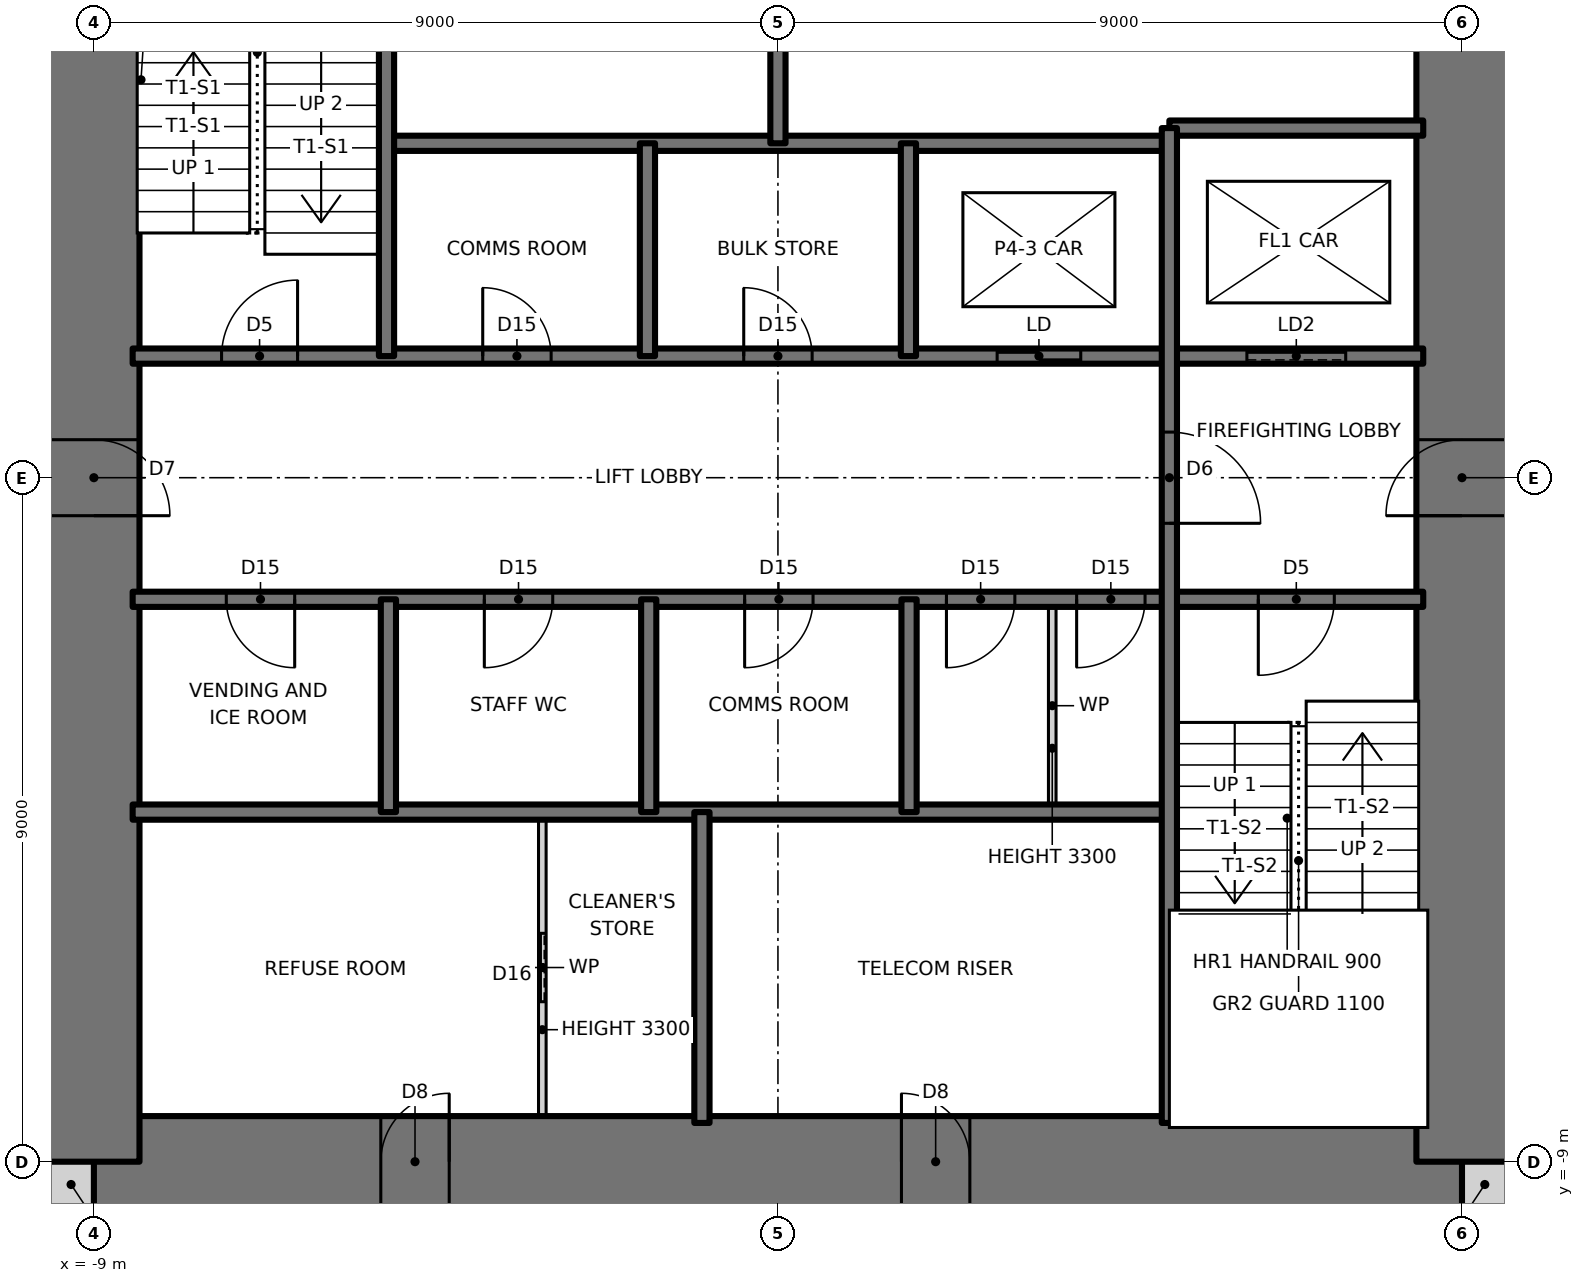
"""IFC4 building model, lengths in metres.
Left out: names, types, materials, properties, quantities, classifications, styles, units other than length and angle.
Written with IfcOpenShell. Run it as: python <this file> out.ifc"""

import sys

from ifc_helpers import new_model, si_unit, direction, frame, frame_2d, origin, place, context, subcontext, project, spatial, rectangle, extrude, element, fill, save


model = new_model("IFC4")
c1 = context("Model", 3, precision=1e-05, world=origin(), true_north=direction((0.0, 1.0)))
c2 = subcontext(c1, "Body", "Model", "MODEL_VIEW")
j1 = project(units=[si_unit("LENGTHUNIT", "METRE"), si_unit("PLANEANGLEUNIT", "RADIAN")], contexts=[c1])
p1 = place(None, origin())
s1 = spatial("IfcSite", under=j1, at=p1, CompositionType="ELEMENT")
p2 = place(p1, origin())
s2 = spatial("IfcBuilding", under=s1, at=p2, CompositionType="ELEMENT")
p3 = place(p2, frame((0.0, 0.0, 250.0)))
s3 = spatial("IfcBuildingStorey", under=s2, at=p3, CompositionType="ELEMENT", Elevation=250.0)
for number, where, z_axis, x_axis in (
    (1, (-9.6, -9.3, 0.0), (0.0, 0.0, 1.0), (1.0, 0.0, 0.0)),
    (2, (9.0, -9.3, 0.0), (0.0, 0.0, 1.0), (1.0, 0.0, 0.0)),
):
    element("IfcWall", number, at=place(p3, frame(where, z_axis=z_axis, x_axis=x_axis)), inside=s3, PredefinedType="SOLIDWALL", context=c2, shape_type="SweptSolid", body=[
        extrude(rectangle(XDim=0.6, YDim=0.6, at=frame_2d((0.3, 0.0))), origin(), (0.0, 0.0, 1.0), 3.5),
    ])
p4 = place(p3, frame((-9.0, -9.0, 0.0), z_axis=(0.0, 0.0, 1.0), x_axis=(1.0, 0.0, 0.0)))
e3 = element("IfcWall", 3, at=p4, inside=s3, PredefinedType="SHEAR", context=c2, shape_type="SweptSolid", body=[
    extrude(rectangle(XDim=18.0, YDim=1.2, at=frame_2d((9.0, 0.0))), origin(), (0.0, 0.0, 1.0), 3.5),
])
p5 = place(p4, frame((3.775, 0.0, 0.0)))
e4 = element("IfcOpeningElement", 4, at=p5, cuts=e3, PredefinedType="OPENING", context=c2, shape_type="SweptSolid", body=[
    extrude(rectangle(XDim=0.9, YDim=2.1, at=frame_2d((0.45, 1.05))), frame((0.0, 0.61, 0.0), z_axis=(0.0, -1.0, 0.0), x_axis=(1.0, 0.0, 0.0)), (0.0, 0.0, 1.0), 1.22),
])
p6 = place(p4, frame((10.625, 0.0, 0.0)))
e5 = element("IfcOpeningElement", 5, at=p6, cuts=e3, PredefinedType="OPENING", context=c2, shape_type="SweptSolid", body=[
    extrude(rectangle(XDim=0.9, YDim=2.1, at=frame_2d((0.45, 1.05))), frame((0.0, 0.61, 0.0), z_axis=(0.0, -1.0, 0.0), x_axis=(1.0, 0.0, 0.0)), (0.0, 0.0, 1.0), 1.22),
])
p7 = place(p3, frame((9.0, -9.0, 0.0), z_axis=(0.0, 0.0, 1.0), x_axis=(0.0, 1.0, 0.0)))
e6 = element("IfcWall", 6, at=p7, inside=s3, PredefinedType="SHEAR", context=c2, shape_type="SweptSolid", body=[
    extrude(rectangle(XDim=18.0, YDim=1.2, at=frame_2d((9.0, 0.0))), origin(), (0.0, 0.0, 1.0), 3.5),
])
p8 = place(p7, frame((8.5, 0.0, 0.0)))
e7 = element("IfcOpeningElement", 7, at=p8, cuts=e6, PredefinedType="OPENING", context=c2, shape_type="SweptSolid", body=[
    extrude(rectangle(XDim=1.0, YDim=2.1, at=frame_2d((0.5, 1.05))), frame((0.0, 0.61, 0.0), z_axis=(0.0, -1.0, 0.0), x_axis=(1.0, 0.0, 0.0)), (0.0, 0.0, 1.0), 1.22),
])
p9 = place(p3, frame((-9.0, 9.0, 0.0), z_axis=(0.0, 0.0, 1.0), x_axis=(0.0, -1.0, 0.0)))
e8 = element("IfcWall", 8, at=p9, inside=s3, PredefinedType="SHEAR", context=c2, shape_type="SweptSolid", body=[
    extrude(rectangle(XDim=18.0, YDim=1.2, at=frame_2d((9.0, 0.0))), origin(), (0.0, 0.0, 1.0), 3.5),
])
p10 = place(p9, frame((8.5, 0.0, 0.0)))
e9 = element("IfcOpeningElement", 9, at=p10, cuts=e8, PredefinedType="OPENING", context=c2, shape_type="SweptSolid", body=[
    extrude(rectangle(XDim=1.0, YDim=2.1, at=frame_2d((0.5, 1.05))), frame((0.0, 0.61, 0.0), z_axis=(0.0, -1.0, 0.0), x_axis=(1.0, 0.0, 0.0)), (0.0, 0.0, 1.0), 1.22),
])
p11 = place(p3, frame((-8.49, -4.4, 0.0), z_axis=(0.0, 0.0, 1.0), x_axis=(1.0, 0.0, 0.0)))
e10 = element("IfcWall", 10, at=p11, inside=s3, PredefinedType="SOLIDWALL", context=c2, shape_type="SweptSolid", body=[
    extrude(rectangle(XDim=13.64, YDim=0.2, at=frame_2d((6.82, 0.0))), origin(), (0.0, 0.0, 1.0), 3.5),
])
p12 = place(p3, frame((-8.49, -1.6, 0.0), z_axis=(0.0, 0.0, 1.0), x_axis=(1.0, 0.0, 0.0)))
e11 = element("IfcWall", 11, at=p12, inside=s3, PredefinedType="SOLIDWALL", context=c2, shape_type="SweptSolid", body=[
    extrude(rectangle(XDim=16.98, YDim=0.2, at=frame_2d((8.49, 0.0))), origin(), (0.0, 0.0, 1.0), 3.5),
])
p13 = place(p12, frame((14.81, 0.0, 0.0)))
e12 = element("IfcOpeningElement", 12, at=p13, cuts=e11, PredefinedType="OPENING", context=c2, shape_type="SweptSolid", body=[
    extrude(rectangle(XDim=1.0, YDim=2.1, at=frame_2d((0.5, 1.05))), frame((0.0, 0.11, 0.0), z_axis=(0.0, -1.0, 0.0), x_axis=(1.0, 0.0, 0.0)), (0.0, 0.0, 1.0), 0.22),
])
p14 = place(p12, frame((1.232, 0.0, 0.0)))
e13 = element("IfcOpeningElement", 13, at=p14, cuts=e11, PredefinedType="OPENING", context=c2, shape_type="SweptSolid", body=[
    extrude(rectangle(XDim=0.9, YDim=2.1, at=frame_2d((0.45, 1.05))), frame((0.0, 0.11, 0.0), z_axis=(0.0, -1.0, 0.0), x_axis=(1.0, 0.0, 0.0)), (0.0, 0.0, 1.0), 0.22),
])
p15 = place(p12, frame((4.627, 0.0, 0.0)))
e14 = element("IfcOpeningElement", 14, at=p15, cuts=e11, PredefinedType="OPENING", context=c2, shape_type="SweptSolid", body=[
    extrude(rectangle(XDim=0.9, YDim=2.1, at=frame_2d((0.45, 1.05))), frame((0.0, 0.11, 0.0), z_axis=(0.0, -1.0, 0.0), x_axis=(1.0, 0.0, 0.0)), (0.0, 0.0, 1.0), 0.22),
])
p16 = place(p12, frame((8.052, 0.0, 0.0)))
e15 = element("IfcOpeningElement", 15, at=p16, cuts=e11, PredefinedType="OPENING", context=c2, shape_type="SweptSolid", body=[
    extrude(rectangle(XDim=0.9, YDim=2.1, at=frame_2d((0.45, 1.05))), frame((0.0, 0.11, 0.0), z_axis=(0.0, -1.0, 0.0), x_axis=(1.0, 0.0, 0.0)), (0.0, 0.0, 1.0), 0.22),
])
p17 = place(p12, frame((12.42, 0.0, 0.0)))
e16 = element("IfcOpeningElement", 16, at=p17, cuts=e11, PredefinedType="OPENING", context=c2, shape_type="SweptSolid", body=[
    extrude(rectangle(XDim=0.9, YDim=2.1, at=frame_2d((0.45, 1.05))), frame((0.0, 0.11, 0.0), z_axis=(0.0, -1.0, 0.0), x_axis=(1.0, 0.0, 0.0)), (0.0, 0.0, 1.0), 0.22),
])
p18 = place(p12, frame((10.707, 0.0, 0.0)))
e17 = element("IfcOpeningElement", 17, at=p18, cuts=e11, PredefinedType="OPENING", context=c2, shape_type="SweptSolid", body=[
    extrude(rectangle(XDim=0.9, YDim=2.1, at=frame_2d((0.45, 1.05))), frame((0.0, 0.11, 0.0), z_axis=(0.0, -1.0, 0.0), x_axis=(1.0, 0.0, 0.0)), (0.0, 0.0, 1.0), 0.22),
])
p19 = place(p3, frame((-8.49, 1.6, 0.0), z_axis=(0.0, 0.0, 1.0), x_axis=(1.0, 0.0, 0.0)))
e18 = element("IfcWall", 18, at=p19, inside=s3, PredefinedType="SOLIDWALL", context=c2, shape_type="SweptSolid", body=[
    extrude(rectangle(XDim=16.98, YDim=0.2, at=frame_2d((8.49, 0.0))), origin(), (0.0, 0.0, 1.0), 3.5),
])
p20 = place(p19, frame((1.17, 0.0, 0.0)))
e19 = element("IfcOpeningElement", 19, at=p20, cuts=e18, PredefinedType="OPENING", context=c2, shape_type="SweptSolid", body=[
    extrude(rectangle(XDim=1.0, YDim=2.1, at=frame_2d((0.5, 1.05))), frame((0.0, 0.11, 0.0), z_axis=(0.0, -1.0, 0.0), x_axis=(1.0, 0.0, 0.0)), (0.0, 0.0, 1.0), 0.22),
])
p21 = place(p19, frame((4.606, 0.0, 0.0)))
e20 = element("IfcOpeningElement", 20, at=p21, cuts=e18, PredefinedType="OPENING", context=c2, shape_type="SweptSolid", body=[
    extrude(rectangle(XDim=0.9, YDim=2.1, at=frame_2d((0.45, 1.05))), frame((0.0, 0.11, 0.0), z_axis=(0.0, -1.0, 0.0), x_axis=(1.0, 0.0, 0.0)), (0.0, 0.0, 1.0), 0.22),
])
p22 = place(p19, frame((8.04, 0.0, 0.0)))
e21 = element("IfcOpeningElement", 21, at=p22, cuts=e18, PredefinedType="OPENING", context=c2, shape_type="SweptSolid", body=[
    extrude(rectangle(XDim=0.9, YDim=2.1, at=frame_2d((0.45, 1.05))), frame((0.0, 0.11, 0.0), z_axis=(0.0, -1.0, 0.0), x_axis=(1.0, 0.0, 0.0)), (0.0, 0.0, 1.0), 0.22),
])
p23 = place(p19, frame((11.374, 0.0, 0.0)))
e22 = element("IfcOpeningElement", 22, at=p23, cuts=e18, PredefinedType="OPENING", context=c2, shape_type="SweptSolid", body=[
    extrude(rectangle(XDim=1.1, YDim=2.1, at=frame_2d((0.55, 1.05))), frame((0.0, 0.11, 0.0), z_axis=(0.0, -1.0, 0.0), x_axis=(1.0, 0.0, 0.0)), (0.0, 0.0, 1.0), 0.22),
])
p24 = place(p19, frame((14.66, 0.0, 0.0)))
e23 = element("IfcOpeningElement", 23, at=p24, cuts=e18, PredefinedType="OPENING", context=c2, shape_type="SweptSolid", body=[
    extrude(rectangle(XDim=1.3, YDim=2.1, at=frame_2d((0.65, 1.05))), frame((0.0, 0.11, 0.0), z_axis=(0.0, -1.0, 0.0), x_axis=(1.0, 0.0, 0.0)), (0.0, 0.0, 1.0), 0.22),
])
p25 = place(p3, frame((-5.15, 4.4, 0.0), z_axis=(0.0, 0.0, 1.0), x_axis=(1.0, 0.0, 0.0)))
e24 = element("IfcWall", 24, at=p25, inside=s3, PredefinedType="SOLIDWALL", context=c2, shape_type="SweptSolid", body=[
    extrude(rectangle(XDim=10.3, YDim=0.2, at=frame_2d((5.15, 0.0))), origin(), (0.0, 0.0, 1.0), 3.5),
])
p26 = place(p3, frame((5.15, 4.6, 0.0), z_axis=(0.0, 0.0, 1.0), x_axis=(1.0, 0.0, 0.0)))
e25 = element("IfcWall", 25, at=p26, inside=s3, PredefinedType="SOLIDWALL", context=c2, shape_type="SweptSolid", body=[
    extrude(rectangle(XDim=3.34, YDim=0.2, at=frame_2d((1.67, 0.0))), origin(), (0.0, 0.0, 1.0), 3.5),
])
p27 = place(p3, frame((5.15, -8.49, 0.0), z_axis=(0.0, 0.0, 1.0), x_axis=(0.0, 1.0, 0.0)))
e26 = element("IfcWall", 26, at=p27, inside=s3, PredefinedType="SOLIDWALL", context=c2, shape_type="SweptSolid", body=[
    extrude(rectangle(XDim=13.09, YDim=0.2, at=frame_2d((6.545, 0.0))), origin(), (0.0, 0.0, 1.0), 3.5),
])
p28 = place(p27, frame((7.89, 0.0, 0.0)))
e27 = element("IfcOpeningElement", 27, at=p28, cuts=e26, PredefinedType="OPENING", context=c2, shape_type="SweptSolid", body=[
    extrude(rectangle(XDim=1.2, YDim=2.1, at=frame_2d((0.6, 1.05))), frame((0.0, 0.11, 0.0), z_axis=(0.0, -1.0, 0.0), x_axis=(1.0, 0.0, 0.0)), (0.0, 0.0, 1.0), 0.22),
])
p29 = place(p3, frame((3.609, -4.4, 0.0), z_axis=(0.0, 0.0, 1.0), x_axis=(0.0, 1.0, 0.0)))
e28 = element("IfcWall", 28, at=p29, inside=s3, PredefinedType="PARTITIONING", context=c2, shape_type="SweptSolid", body=[
    extrude(rectangle(XDim=2.8, YDim=0.1, at=frame_2d((1.4, 0.0))), origin(), (0.0, 0.0, 1.0), 3.3),
])
for number, where, z_axis, x_axis in (
    (29, (1.725, -4.4, 0.0), (0.0, 0.0, 1.0), (0.0, 1.0, 0.0)),
    (30, (1.717, 1.6, 0.0), (0.0, 0.0, 1.0), (0.0, 1.0, 0.0)),
):
    element("IfcWall", number, at=place(p3, frame(where, z_axis=z_axis, x_axis=x_axis)), inside=s3, PredefinedType="SOLIDWALL", context=c2, shape_type="SweptSolid", body=[
        extrude(rectangle(XDim=2.8, YDim=0.2, at=frame_2d((1.4, 0.0))), origin(), (0.0, 0.0, 1.0), 3.5),
    ])
for number, where, z_axis, x_axis in (
    (31, (0.0, 4.4, 0.0), (0.0, 0.0, 1.0), (0.0, 1.0, 0.0)),
    (32, (-1.0, -8.49, 0.0), (0.0, 0.0, 1.0), (0.0, 1.0, 0.0)),
):
    element("IfcWall", number, at=place(p3, frame(where, z_axis=z_axis, x_axis=x_axis)), inside=s3, PredefinedType="SOLIDWALL", context=c2, shape_type="SweptSolid", body=[
        extrude(rectangle(XDim=4.09, YDim=0.2, at=frame_2d((2.045, 0.0))), origin(), (0.0, 0.0, 1.0), 3.5),
    ])
for number, where, z_axis, x_axis in (
    (33, (-1.7, -4.4, 0.0), (0.0, 0.0, 1.0), (0.0, 1.0, 0.0)),
    (34, (-1.717, 1.6, 0.0), (0.0, 0.0, 1.0), (0.0, 1.0, 0.0)),
):
    element("IfcWall", number, at=place(p3, frame(where, z_axis=z_axis, x_axis=x_axis)), inside=s3, PredefinedType="SOLIDWALL", context=c2, shape_type="SweptSolid", body=[
        extrude(rectangle(XDim=2.8, YDim=0.2, at=frame_2d((1.4, 0.0))), origin(), (0.0, 0.0, 1.0), 3.5),
    ])
p30 = place(p3, frame((-3.1, -8.49, 0.0), z_axis=(0.0, 0.0, 1.0), x_axis=(0.0, 1.0, 0.0)))
e35 = element("IfcWall", 35, at=p30, inside=s3, PredefinedType="PARTITIONING", context=c2, shape_type="SweptSolid", body=[
    extrude(rectangle(XDim=4.09, YDim=0.1, at=frame_2d((2.045, 0.0))), origin(), (0.0, 0.0, 1.0), 3.3),
])
p31 = place(p30, frame((1.595, 0.0, 0.0)))
e36 = element("IfcOpeningElement", 36, at=p31, cuts=e35, PredefinedType="OPENING", context=c2, shape_type="SweptSolid", body=[
    extrude(rectangle(XDim=0.9, YDim=2.1, at=frame_2d((0.45, 1.05))), frame((0.0, 0.06, 0.0), z_axis=(0.0, -1.0, 0.0), x_axis=(1.0, 0.0, 0.0)), (0.0, 0.0, 1.0), 0.12),
])
p32 = place(p3, frame((-5.125, -4.4, 0.0), z_axis=(0.0, 0.0, 1.0), x_axis=(0.0, 1.0, 0.0)))
e37 = element("IfcWall", 37, at=p32, inside=s3, PredefinedType="SOLIDWALL", context=c2, shape_type="SweptSolid", body=[
    extrude(rectangle(XDim=2.8, YDim=0.2, at=frame_2d((1.4, 0.0))), origin(), (0.0, 0.0, 1.0), 3.5),
])
p33 = place(p3, frame((-5.15, 1.6, 0.0), z_axis=(0.0, 0.0, 1.0), x_axis=(0.0, 1.0, 0.0)))
e38 = element("IfcWall", 38, at=p33, inside=s3, PredefinedType="SOLIDWALL", context=c2, shape_type="SweptSolid", body=[
    extrude(rectangle(XDim=6.89, YDim=0.2, at=frame_2d((3.445, 0.0))), origin(), (0.0, 0.0, 1.0), 3.5),
])
p34 = place(p20, origin())
e39 = element("IfcDoor", 39, at=p34, inside=s3, OperationType="SINGLE_SWING_RIGHT", PredefinedType="DOOR", context=c2, shape_type="SweptSolid", body=[
    extrude(rectangle(XDim=1.0, YDim=2.1, at=frame_2d((0.5, 1.05))), frame((0.0, 0.025, 0.0), z_axis=(0.0, -1.0, 0.0), x_axis=(1.0, 0.0, 0.0)), (0.0, 0.0, 1.0), 0.05),
])
fill(e19, e39)
p35 = place(p13, frame((1.0, 0.0, 0.0), z_axis=(0.0, 0.0, 1.0), x_axis=(-1.0, 0.0, 0.0)))
e40 = element("IfcDoor", 40, at=p35, inside=s3, OperationType="SINGLE_SWING_RIGHT", PredefinedType="DOOR", context=c2, shape_type="SweptSolid", body=[
    extrude(rectangle(XDim=1.0, YDim=2.1, at=frame_2d((0.5, 1.05))), frame((0.0, 0.025, 0.0), z_axis=(0.0, -1.0, 0.0), x_axis=(1.0, 0.0, 0.0)), (0.0, 0.0, 1.0), 0.05),
])
fill(e12, e40)
p36 = place(p28, frame((1.2, 0.0, 0.0), z_axis=(0.0, 0.0, 1.0), x_axis=(-1.0, 0.0, 0.0)))
e41 = element("IfcDoor", 41, at=p36, inside=s3, OperationType="SINGLE_SWING_RIGHT", PredefinedType="DOOR", context=c2, shape_type="SweptSolid", body=[
    extrude(rectangle(XDim=1.2, YDim=2.1, at=frame_2d((0.6, 1.05))), frame((0.0, 0.025, 0.0), z_axis=(0.0, -1.0, 0.0), x_axis=(1.0, 0.0, 0.0)), (0.0, 0.0, 1.0), 0.05),
])
fill(e27, e41)
p37 = place(p21, origin())
e42 = element("IfcDoor", 42, at=p37, inside=s3, OperationType="SINGLE_SWING_LEFT", PredefinedType="DOOR", context=c2, shape_type="SweptSolid", body=[
    extrude(rectangle(XDim=0.9, YDim=2.1, at=frame_2d((0.45, 1.05))), frame((0.0, 0.025, 0.0), z_axis=(0.0, -1.0, 0.0), x_axis=(1.0, 0.0, 0.0)), (0.0, 0.0, 1.0), 0.05),
])
fill(e20, e42)
p38 = place(p22, origin())
e43 = element("IfcDoor", 43, at=p38, inside=s3, OperationType="SINGLE_SWING_LEFT", PredefinedType="DOOR", context=c2, shape_type="SweptSolid", body=[
    extrude(rectangle(XDim=0.9, YDim=2.1, at=frame_2d((0.45, 1.05))), frame((0.0, 0.025, 0.0), z_axis=(0.0, -1.0, 0.0), x_axis=(1.0, 0.0, 0.0)), (0.0, 0.0, 1.0), 0.05),
])
fill(e21, e43)
p39 = place(p14, frame((0.9, 0.0, 0.0), z_axis=(0.0, 0.0, 1.0), x_axis=(-1.0, 0.0, 0.0)))
e44 = element("IfcDoor", 44, at=p39, inside=s3, OperationType="SINGLE_SWING_LEFT", PredefinedType="DOOR", context=c2, shape_type="SweptSolid", body=[
    extrude(rectangle(XDim=0.9, YDim=2.1, at=frame_2d((0.45, 1.05))), frame((0.0, 0.025, 0.0), z_axis=(0.0, -1.0, 0.0), x_axis=(1.0, 0.0, 0.0)), (0.0, 0.0, 1.0), 0.05),
])
fill(e13, e44)
p40 = place(p15, frame((0.9, 0.0, 0.0), z_axis=(0.0, 0.0, 1.0), x_axis=(-1.0, 0.0, 0.0)))
e45 = element("IfcDoor", 45, at=p40, inside=s3, OperationType="SINGLE_SWING_RIGHT", PredefinedType="DOOR", context=c2, shape_type="SweptSolid", body=[
    extrude(rectangle(XDim=0.9, YDim=2.1, at=frame_2d((0.45, 1.05))), frame((0.0, 0.025, 0.0), z_axis=(0.0, -1.0, 0.0), x_axis=(1.0, 0.0, 0.0)), (0.0, 0.0, 1.0), 0.05),
])
fill(e14, e45)
p41 = place(p16, frame((0.9, 0.0, 0.0), z_axis=(0.0, 0.0, 1.0), x_axis=(-1.0, 0.0, 0.0)))
e46 = element("IfcDoor", 46, at=p41, inside=s3, OperationType="SINGLE_SWING_RIGHT", PredefinedType="DOOR", context=c2, shape_type="SweptSolid", body=[
    extrude(rectangle(XDim=0.9, YDim=2.1, at=frame_2d((0.45, 1.05))), frame((0.0, 0.025, 0.0), z_axis=(0.0, -1.0, 0.0), x_axis=(1.0, 0.0, 0.0)), (0.0, 0.0, 1.0), 0.05),
])
fill(e15, e46)
p42 = place(p17, frame((0.9, 0.0, 0.0), z_axis=(0.0, 0.0, 1.0), x_axis=(-1.0, 0.0, 0.0)))
e47 = element("IfcDoor", 47, at=p42, inside=s3, OperationType="SINGLE_SWING_RIGHT", PredefinedType="DOOR", context=c2, shape_type="SweptSolid", body=[
    extrude(rectangle(XDim=0.9, YDim=2.1, at=frame_2d((0.45, 1.05))), frame((0.0, 0.025, 0.0), z_axis=(0.0, -1.0, 0.0), x_axis=(1.0, 0.0, 0.0)), (0.0, 0.0, 1.0), 0.05),
])
fill(e16, e47)
p43 = place(p18, frame((0.9, 0.0, 0.0), z_axis=(0.0, 0.0, 1.0), x_axis=(-1.0, 0.0, 0.0)))
e48 = element("IfcDoor", 48, at=p43, inside=s3, OperationType="SINGLE_SWING_RIGHT", PredefinedType="DOOR", context=c2, shape_type="SweptSolid", body=[
    extrude(rectangle(XDim=0.9, YDim=2.1, at=frame_2d((0.45, 1.05))), frame((0.0, 0.025, 0.0), z_axis=(0.0, -1.0, 0.0), x_axis=(1.0, 0.0, 0.0)), (0.0, 0.0, 1.0), 0.05),
])
fill(e17, e48)
p44 = place(p31, origin())
e49 = element("IfcDoor", 49, at=p44, inside=s3, OperationType="SLIDING_TO_LEFT", PredefinedType="DOOR", context=c2, shape_type="SweptSolid", body=[
    extrude(rectangle(XDim=0.9, YDim=2.1, at=frame_2d((0.45, 1.05))), frame((0.0, 0.025, 0.0), z_axis=(0.0, -1.0, 0.0), x_axis=(1.0, 0.0, 0.0)), (0.0, 0.0, 1.0), 0.05),
])
fill(e36, e49)
p45 = place(p10, origin())
e50 = element("IfcDoor", 50, at=p45, inside=s3, OperationType="SINGLE_SWING_RIGHT", PredefinedType="DOOR", context=c2, shape_type="SweptSolid", body=[
    extrude(rectangle(XDim=1.0, YDim=2.1, at=frame_2d((0.5, 1.05))), frame((0.0, 0.025, 0.0), z_axis=(0.0, -1.0, 0.0), x_axis=(1.0, 0.0, 0.0)), (0.0, 0.0, 1.0), 0.05),
])
fill(e9, e50)
p46 = place(p8, origin())
e51 = element("IfcDoor", 51, at=p46, inside=s3, OperationType="SINGLE_SWING_LEFT", PredefinedType="DOOR", context=c2, shape_type="SweptSolid", body=[
    extrude(rectangle(XDim=1.0, YDim=2.1, at=frame_2d((0.5, 1.05))), frame((0.0, 0.025, 0.0), z_axis=(0.0, -1.0, 0.0), x_axis=(1.0, 0.0, 0.0)), (0.0, 0.0, 1.0), 0.05),
])
fill(e7, e51)
p47 = place(p5, origin())
e52 = element("IfcDoor", 52, at=p47, inside=s3, OperationType="SINGLE_SWING_RIGHT", PredefinedType="DOOR", context=c2, shape_type="SweptSolid", body=[
    extrude(rectangle(XDim=0.9, YDim=2.1, at=frame_2d((0.45, 1.05))), frame((0.0, 0.025, 0.0), z_axis=(0.0, -1.0, 0.0), x_axis=(1.0, 0.0, 0.0)), (0.0, 0.0, 1.0), 0.05),
])
fill(e4, e52)
p48 = place(p6, origin())
e53 = element("IfcDoor", 53, at=p48, inside=s3, OperationType="SINGLE_SWING_LEFT", PredefinedType="DOOR", context=c2, shape_type="SweptSolid", body=[
    extrude(rectangle(XDim=0.9, YDim=2.1, at=frame_2d((0.45, 1.05))), frame((0.0, 0.025, 0.0), z_axis=(0.0, -1.0, 0.0), x_axis=(1.0, 0.0, 0.0)), (0.0, 0.0, 1.0), 0.05),
])
fill(e5, e53)
p49 = place(p23, origin())
e54 = element("IfcDoor", 54, at=p49, inside=s3, OperationType="DOUBLE_DOOR_SLIDING", PredefinedType="DOOR", context=c2, shape_type="SweptSolid", body=[
    extrude(rectangle(XDim=1.1, YDim=2.1, at=frame_2d((0.55, 1.05))), frame((0.0, 0.025, 0.0), z_axis=(0.0, -1.0, 0.0), x_axis=(1.0, 0.0, 0.0)), (0.0, 0.0, 1.0), 0.05),
])
fill(e22, e54)
p50 = place(p24, origin())
e55 = element("IfcDoor", 55, at=p50, inside=s3, OperationType="SLIDING_TO_LEFT", PredefinedType="DOOR", context=c2, shape_type="SweptSolid", body=[
    extrude(rectangle(XDim=1.3, YDim=2.1, at=frame_2d((0.65, 1.05))), frame((0.0, 0.025, 0.0), z_axis=(0.0, -1.0, 0.0), x_axis=(1.0, 0.0, 0.0)), (0.0, 0.0, 1.0), 0.05),
])
fill(e23, e55)
save(model, sys.argv[1])
